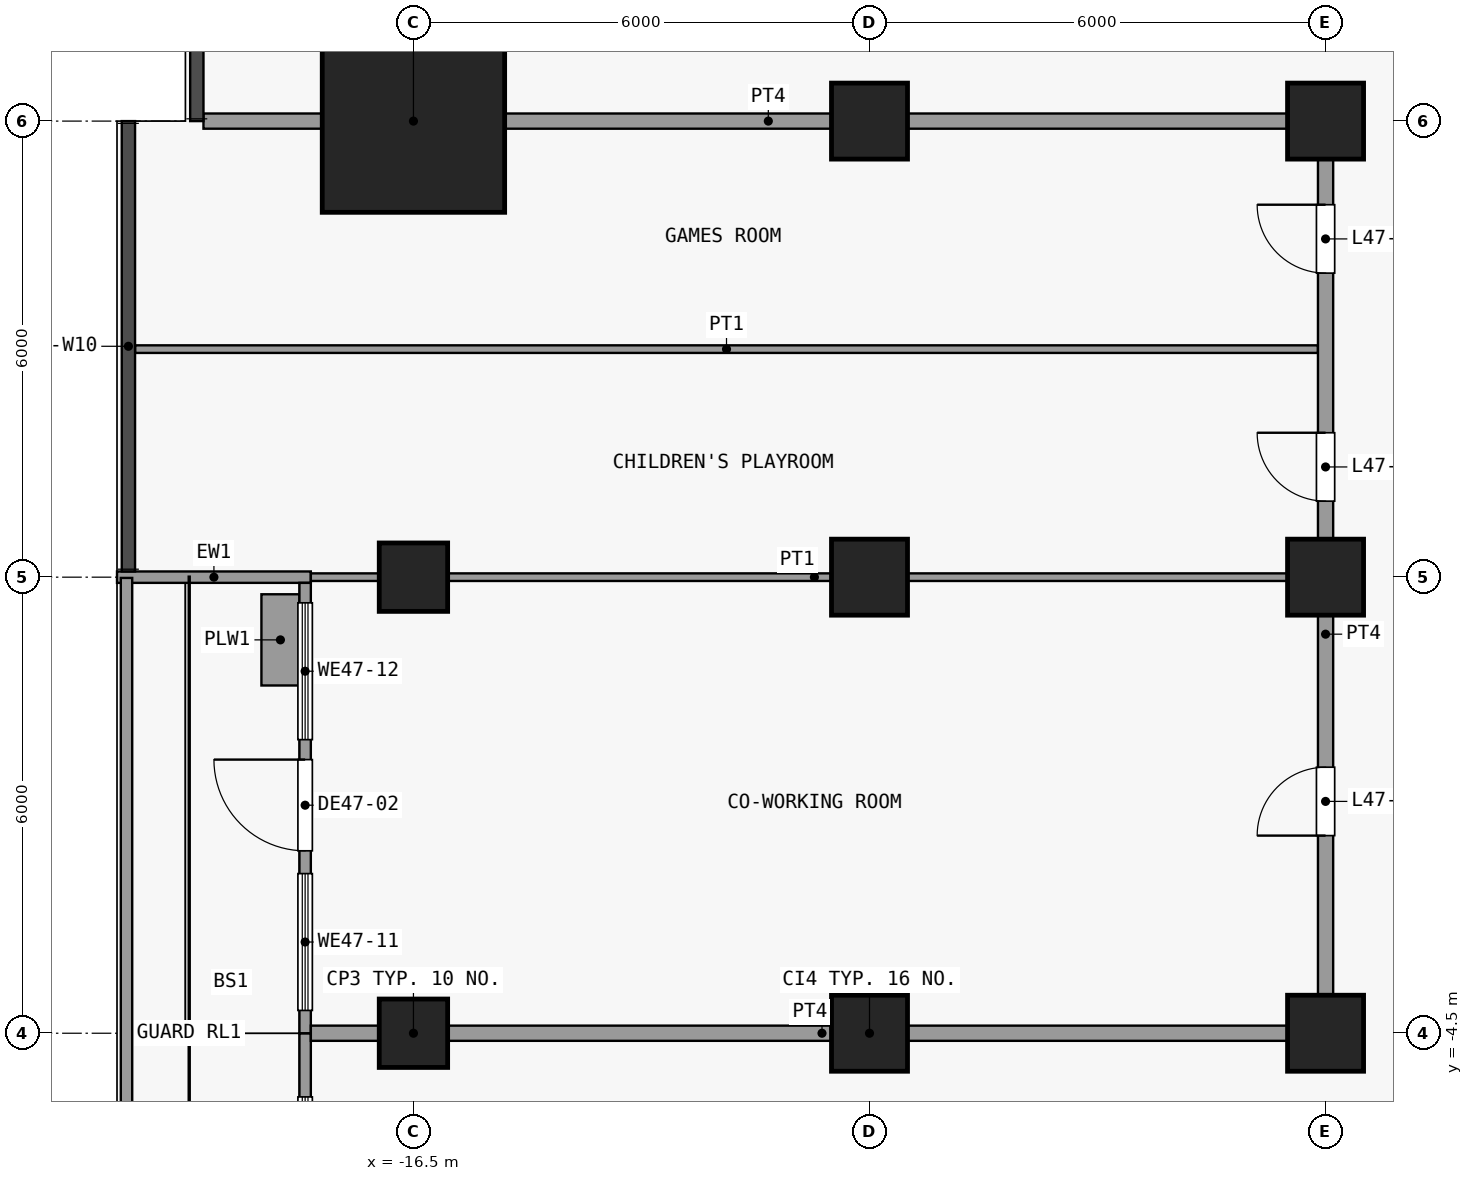
"""IFC4 building model, lengths in metres.
Left out: names, types, materials, properties, quantities, classifications, styles, units other than length and angle.
Written with IfcOpenShell. Run it as: python <this file> out.ifc"""

import sys

from ifc_helpers import new_model, si_unit, direction, frame, frame_2d, origin, origin_2d, place, context, subcontext, project, spatial, rectangle, extrude, element, fill, save


model = new_model("IFC4")
c1 = context("Model", 3, precision=1e-05, world=origin(), true_north=direction((0.0, 1.0)))
c2 = subcontext(c1, "Body", "Model", "MODEL_VIEW")
j1 = project(units=[si_unit("LENGTHUNIT", "METRE"), si_unit("PLANEANGLEUNIT", "RADIAN")], contexts=[c1])
p1 = place(None, origin())
s1 = spatial("IfcSite", under=j1, at=p1, CompositionType="ELEMENT")
p2 = place(p1, origin())
s2 = spatial("IfcBuilding", under=s1, at=p2, CompositionType="ELEMENT")
p3 = place(p2, frame((0.0, 0.0, 188.9)))
s3 = spatial("IfcBuildingStorey", under=s2, at=p3, CompositionType="ELEMENT", Elevation=188.9)
for number, where, z_axis, x_axis in (
    (1, (-16.5, -4.5, 0.0), (0.0, 0.0, 1.0), (1.0, 0.0, 0.0)),
    (2, (-16.5, 1.5, 0.0), (0.0, 0.0, 1.0), (1.0, 0.0, 0.0)),
):
    element("IfcColumn", number, at=place(p3, frame(where, z_axis=z_axis, x_axis=x_axis)), inside=s3, PredefinedType="COLUMN", context=c2, shape_type="SweptSolid", body=[
        extrude(rectangle(XDim=0.9, YDim=0.9, at=origin_2d()), origin(), (0.0, 0.0, 1.0), 3.6),
    ])
p4 = place(p3, frame((-16.5, 7.5, 0.0), z_axis=(0.0, 0.0, 1.0), x_axis=(1.0, 0.0, 0.0)))
e3 = element("IfcColumn", 3, at=p4, inside=s3, PredefinedType="COLUMN", context=c2, shape_type="SweptSolid", body=[
    extrude(rectangle(XDim=2.4, YDim=2.4, at=origin_2d()), origin(), (0.0, 0.0, 1.0), 3.6),
])
for number, where, z_axis, x_axis in (
    (4, (-10.5, -4.5, 0.0), (0.0, 0.0, 1.0), (1.0, 0.0, 0.0)),
    (5, (-10.5, 1.5, 0.0), (0.0, 0.0, 1.0), (1.0, 0.0, 0.0)),
    (6, (-10.5, 7.5, 0.0), (0.0, 0.0, 1.0), (1.0, 0.0, 0.0)),
    (7, (-4.5, -4.5, 0.0), (0.0, 0.0, 1.0), (1.0, 0.0, 0.0)),
    (8, (-4.5, 1.5, 0.0), (0.0, 0.0, 1.0), (1.0, 0.0, 0.0)),
    (9, (-4.5, 7.5, 0.0), (0.0, 0.0, 1.0), (1.0, 0.0, 0.0)),
):
    element("IfcColumn", number, at=place(p3, frame(where, z_axis=z_axis, x_axis=x_axis)), inside=s3, PredefinedType="COLUMN", context=c2, shape_type="SweptSolid", body=[
        extrude(rectangle(XDim=1.0, YDim=1.0, at=origin_2d()), origin(), (0.0, 0.0, 1.0), 3.6),
    ])
p5 = place(p3, frame((-17.925, -13.425, 0.0), z_axis=(0.0, 0.0, 1.0), x_axis=(0.0, 1.0, 0.0)))
e10 = element("IfcWall", 10, at=p5, inside=s3, PredefinedType="SOLIDWALL", context=c2, shape_type="SweptSolid", body=[
    extrude(rectangle(XDim=8.925, YDim=0.15, at=frame_2d((4.462, 0.0))), origin(), (0.0, 0.0, 1.0), 3.3),
])
p6 = place(p5, frame((3.05, 0.0, 0.0)))
e11 = element("IfcOpeningElement", 11, at=p6, cuts=e10, PredefinedType="OPENING", context=c2, shape_type="SweptSolid", body=[
    extrude(rectangle(XDim=1.2, YDim=2.4, at=frame_2d((0.6, 1.2))), frame((0.0, 0.085, 0.0), z_axis=(0.0, -1.0, 0.0), x_axis=(1.0, 0.0, 0.0)), (0.0, 0.0, 1.0), 0.17),
])
p7 = place(p5, frame((0.25, 0.0, 0.9)))
e12 = element("IfcOpeningElement", 12, at=p7, cuts=e10, PredefinedType="OPENING", context=c2, shape_type="SweptSolid", body=[
    extrude(rectangle(XDim=2.05, YDim=2.1, at=frame_2d((1.025, 1.05))), frame((0.0, 0.085, 0.0), z_axis=(0.0, -1.0, 0.0), x_axis=(1.0, 0.0, 0.0)), (0.0, 0.0, 1.0), 0.17),
])
p8 = place(p5, frame((5.775, 0.0, 0.9)))
e13 = element("IfcOpeningElement", 13, at=p8, cuts=e10, PredefinedType="OPENING", context=c2, shape_type="SweptSolid", body=[
    extrude(rectangle(XDim=2.312, YDim=2.1, at=frame_2d((1.156, 1.05))), frame((0.0, 0.085, 0.0), z_axis=(0.0, -1.0, 0.0), x_axis=(1.0, 0.0, 0.0)), (0.0, 0.0, 1.0), 0.17),
])
p9 = place(p3, frame((-17.85, 1.5, 0.0), z_axis=(0.0, 0.0, 1.0), x_axis=(-1.0, 0.0, 0.0)))
e14 = element("IfcWall", 14, at=p9, inside=s3, PredefinedType="SOLIDWALL", context=c2, shape_type="SweptSolid", body=[
    extrude(rectangle(XDim=2.55, YDim=0.15, at=frame_2d((1.275, 0.0))), origin(), (0.0, 0.0, 1.0), 3.3),
])
p10 = place(p3, frame((-17.925, -4.5, 0.0), z_axis=(0.0, 0.0, 1.0), x_axis=(0.0, 1.0, 0.0)))
e15 = element("IfcWall", 15, at=p10, inside=s3, PredefinedType="SOLIDWALL", context=c2, shape_type="SweptSolid", body=[
    extrude(rectangle(XDim=5.925, YDim=0.15, at=frame_2d((2.962, 0.0))), origin(), (0.0, 0.0, 1.0), 3.3),
])
p11 = place(p10, frame((2.4, 0.0, 0.0)))
e16 = element("IfcOpeningElement", 16, at=p11, cuts=e15, PredefinedType="OPENING", context=c2, shape_type="SweptSolid", body=[
    extrude(rectangle(XDim=1.2, YDim=2.4, at=frame_2d((0.6, 1.2))), frame((0.0, 0.085, 0.0), z_axis=(0.0, -1.0, 0.0), x_axis=(1.0, 0.0, 0.0)), (0.0, 0.0, 1.0), 0.17),
])
p12 = place(p10, frame((0.3, 0.0, 0.9)))
e17 = element("IfcOpeningElement", 17, at=p12, cuts=e15, PredefinedType="OPENING", context=c2, shape_type="SweptSolid", body=[
    extrude(rectangle(XDim=1.8, YDim=2.1, at=frame_2d((0.9, 1.05))), frame((0.0, 0.085, 0.0), z_axis=(0.0, -1.0, 0.0), x_axis=(1.0, 0.0, 0.0)), (0.0, 0.0, 1.0), 0.17),
])
p13 = place(p10, frame((3.863, 0.0, 0.9)))
e18 = element("IfcOpeningElement", 18, at=p13, cuts=e15, PredefinedType="OPENING", context=c2, shape_type="SweptSolid", body=[
    extrude(rectangle(XDim=1.8, YDim=2.1, at=frame_2d((0.9, 1.05))), frame((0.0, 0.085, 0.0), z_axis=(0.0, -1.0, 0.0), x_axis=(1.0, 0.0, 0.0)), (0.0, 0.0, 1.0), 0.17),
])
p14 = place(p3, frame((-18.25, 0.075, 0.0), z_axis=(0.0, 0.0, 1.0), x_axis=(0.0, 1.0, 0.0)))
e19 = element("IfcWall", 19, at=p14, inside=s3, PredefinedType="USERDEFINED", context=c2, shape_type="SweptSolid", body=[
    extrude(rectangle(XDim=1.2, YDim=0.5, at=frame_2d((0.6, 0.0))), origin(), (0.0, 0.0, 1.0), 0.9),
])
p15 = place(p3, frame((-20.275, -13.3, 0.0), z_axis=(0.0, 0.0, 1.0), x_axis=(0.0, 1.0, 0.0)))
e20 = element("IfcWall", 20, at=p15, inside=s3, PredefinedType="PARAPET", context=c2, shape_type="SweptSolid", body=[
    extrude(rectangle(XDim=14.79, YDim=0.15, at=frame_2d((7.395, 0.0))), origin(), (0.0, 0.0, 1.0), 1.15),
])
p16 = place(p3, frame((-17.85, -4.5, 0.0), z_axis=(0.0, 0.0, 1.0), x_axis=(1.0, 0.0, 0.0)))
e21 = element("IfcWall", 21, at=p16, inside=s3, PredefinedType="PARTITIONING", context=c2, shape_type="SweptSolid", body=[
    extrude(rectangle(XDim=13.45, YDim=0.2, at=frame_2d((6.725, 0.0))), origin(), (0.0, 0.0, 1.0), 3.3),
])
p17 = place(p3, frame((-17.85, 1.5, 0.0), z_axis=(0.0, 0.0, 1.0), x_axis=(1.0, 0.0, 0.0)))
e22 = element("IfcWall", 22, at=p17, inside=s3, PredefinedType="PARTITIONING", context=c2, shape_type="SweptSolid", body=[
    extrude(rectangle(XDim=13.25, YDim=0.1, at=frame_2d((6.625, 0.0))), origin(), (0.0, 0.0, 1.0), 3.3),
])
p18 = place(p3, frame((-20.163, 4.5, 0.0), z_axis=(0.0, 0.0, 1.0), x_axis=(1.0, 0.0, 0.0)))
e23 = element("IfcWall", 23, at=p18, inside=s3, PredefinedType="PARTITIONING", context=c2, shape_type="SweptSolid", body=[
    extrude(rectangle(XDim=15.562, YDim=0.1, at=frame_2d((7.781, 0.0))), origin(), (0.0, 0.0, 1.0), 3.3),
])
p19 = place(p3, frame((-19.262, 7.5, 0.0), z_axis=(0.0, 0.0, 1.0), x_axis=(1.0, 0.0, 0.0)))
e24 = element("IfcWall", 24, at=p19, inside=s3, PredefinedType="PARTITIONING", context=c2, shape_type="SweptSolid", body=[
    extrude(rectangle(XDim=14.863, YDim=0.2, at=frame_2d((7.431, 0.0))), origin(), (0.0, 0.0, 1.0), 3.3),
])
p20 = place(p3, frame((-4.5, -4.4, 0.0), z_axis=(0.0, 0.0, 1.0), x_axis=(0.0, 1.0, 0.0)))
e25 = element("IfcWall", 25, at=p20, inside=s3, PredefinedType="PARTITIONING", context=c2, shape_type="SweptSolid", body=[
    extrude(rectangle(XDim=11.8, YDim=0.2, at=frame_2d((5.9, 0.0))), origin(), (0.0, 0.0, 1.0), 3.3),
])
p21 = place(p20, frame((2.5, 0.0, 0.0)))
e26 = element("IfcOpeningElement", 26, at=p21, cuts=e25, PredefinedType="OPENING", context=c2, shape_type="SweptSolid", body=[
    extrude(rectangle(XDim=0.9, YDim=2.1, at=frame_2d((0.45, 1.05))), frame((0.0, 0.11, 0.0), z_axis=(0.0, -1.0, 0.0), x_axis=(1.0, 0.0, 0.0)), (0.0, 0.0, 1.0), 0.22),
])
p22 = place(p20, frame((6.9, 0.0, 0.0)))
e27 = element("IfcOpeningElement", 27, at=p22, cuts=e25, PredefinedType="OPENING", context=c2, shape_type="SweptSolid", body=[
    extrude(rectangle(XDim=0.9, YDim=2.1, at=frame_2d((0.45, 1.05))), frame((0.0, 0.11, 0.0), z_axis=(0.0, -1.0, 0.0), x_axis=(1.0, 0.0, 0.0)), (0.0, 0.0, 1.0), 0.22),
])
p23 = place(p20, frame((9.9, 0.0, 0.0)))
e28 = element("IfcOpeningElement", 28, at=p23, cuts=e25, PredefinedType="OPENING", context=c2, shape_type="SweptSolid", body=[
    extrude(rectangle(XDim=0.9, YDim=2.1, at=frame_2d((0.45, 1.05))), frame((0.0, 0.11, 0.0), z_axis=(0.0, -1.0, 0.0), x_axis=(1.0, 0.0, 0.0)), (0.0, 0.0, 1.0), 0.22),
])
p24 = place(p8, origin())
e29 = element("IfcWindow", 29, at=p24, inside=s3, PartitioningType="SINGLE_PANEL", PredefinedType="WINDOW", context=c2, shape_type="SweptSolid", body=[
    extrude(rectangle(XDim=2.312, YDim=2.1, at=frame_2d((1.156, 1.05))), frame((0.0, 0.03, 0.0), z_axis=(0.0, -1.0, 0.0), x_axis=(1.0, 0.0, 0.0)), (0.0, 0.0, 1.0), 0.06),
])
fill(e13, e29)
p25 = place(p11, origin())
e30 = element("IfcDoor", 30, at=p25, inside=s3, OperationType="SINGLE_SWING_RIGHT", PredefinedType="DOOR", context=c2, shape_type="SweptSolid", body=[
    extrude(rectangle(XDim=1.2, YDim=2.4, at=frame_2d((0.6, 1.2))), frame((0.0, 0.025, 0.0), z_axis=(0.0, -1.0, 0.0), x_axis=(1.0, 0.0, 0.0)), (0.0, 0.0, 1.0), 0.05),
])
fill(e16, e30)
p26 = place(p12, origin())
e31 = element("IfcWindow", 31, at=p26, inside=s3, PartitioningType="SINGLE_PANEL", PredefinedType="WINDOW", context=c2, shape_type="SweptSolid", body=[
    extrude(rectangle(XDim=1.8, YDim=2.1, at=frame_2d((0.9, 1.05))), frame((0.0, 0.03, 0.0), z_axis=(0.0, -1.0, 0.0), x_axis=(1.0, 0.0, 0.0)), (0.0, 0.0, 1.0), 0.06),
])
fill(e17, e31)
p27 = place(p13, origin())
e32 = element("IfcWindow", 32, at=p27, inside=s3, PartitioningType="SINGLE_PANEL", PredefinedType="WINDOW", context=c2, shape_type="SweptSolid", body=[
    extrude(rectangle(XDim=1.8, YDim=2.1, at=frame_2d((0.9, 1.05))), frame((0.0, 0.03, 0.0), z_axis=(0.0, -1.0, 0.0), x_axis=(1.0, 0.0, 0.0)), (0.0, 0.0, 1.0), 0.06),
])
fill(e18, e32)
p28 = place(p21, origin())
e33 = element("IfcDoor", 33, at=p28, inside=s3, OperationType="SINGLE_SWING_RIGHT", PredefinedType="DOOR", context=c2, shape_type="SweptSolid", body=[
    extrude(rectangle(XDim=0.9, YDim=2.1, at=frame_2d((0.45, 1.05))), frame((0.0, 0.025, 0.0), z_axis=(0.0, -1.0, 0.0), x_axis=(1.0, 0.0, 0.0)), (0.0, 0.0, 1.0), 0.05),
])
fill(e26, e33)
p29 = place(p22, origin())
e34 = element("IfcDoor", 34, at=p29, inside=s3, OperationType="SINGLE_SWING_LEFT", PredefinedType="DOOR", context=c2, shape_type="SweptSolid", body=[
    extrude(rectangle(XDim=0.9, YDim=2.1, at=frame_2d((0.45, 1.05))), frame((0.0, 0.025, 0.0), z_axis=(0.0, -1.0, 0.0), x_axis=(1.0, 0.0, 0.0)), (0.0, 0.0, 1.0), 0.05),
])
fill(e27, e34)
p30 = place(p23, origin())
e35 = element("IfcDoor", 35, at=p30, inside=s3, OperationType="SINGLE_SWING_LEFT", PredefinedType="DOOR", context=c2, shape_type="SweptSolid", body=[
    extrude(rectangle(XDim=0.9, YDim=2.1, at=frame_2d((0.45, 1.05))), frame((0.0, 0.025, 0.0), z_axis=(0.0, -1.0, 0.0), x_axis=(1.0, 0.0, 0.0)), (0.0, 0.0, 1.0), 0.05),
])
fill(e28, e35)
save(model, sys.argv[1])
